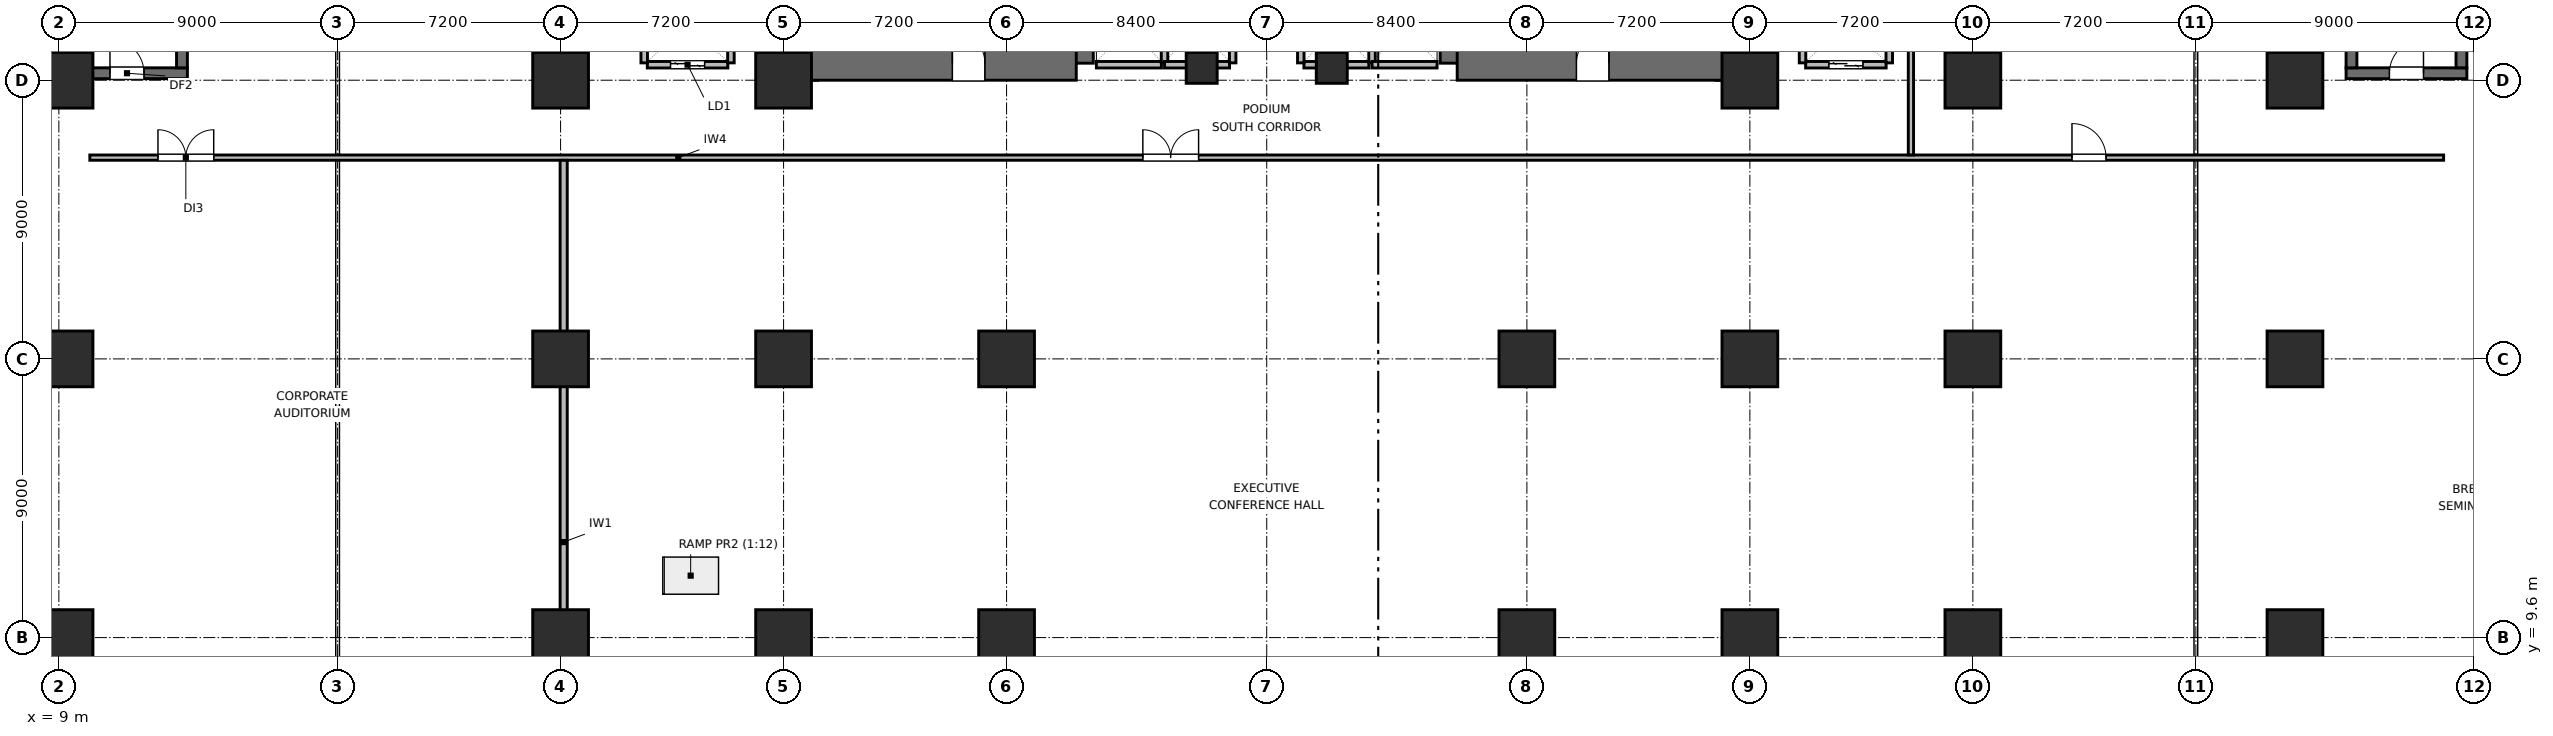
"""IFC4 building model, lengths in metres.
Left out: names, types, materials, properties, quantities, classifications, styles, units other than length and angle.
Written with IfcOpenShell. Run it as: python <this file> out.ifc"""

import sys

from ifc_helpers import new_model, si_unit, direction, frame, frame_2d, origin, origin_2d, place, context, subcontext, project, spatial, rectangle, extrude, element, fill, save


model = new_model("IFC4")
c1 = context("Model", 3, precision=1e-05, world=origin(), true_north=direction((0.0, 1.0)))
c2 = subcontext(c1, "Body", "Model", "MODEL_VIEW")
j1 = project(units=[si_unit("LENGTHUNIT", "METRE"), si_unit("PLANEANGLEUNIT", "RADIAN")], contexts=[c1])
p1 = place(None, origin())
s1 = spatial("IfcSite", under=j1, at=p1, CompositionType="ELEMENT")
p2 = place(p1, origin())
s2 = spatial("IfcBuilding", under=s1, at=p2, CompositionType="ELEMENT")
p3 = place(p2, frame((0.0, 0.0, 4.5)))
s3 = spatial("IfcBuildingStorey", under=s2, at=p3, CompositionType="ELEMENT", Elevation=4.5)
p4 = place(p3, frame((32.95, 27.6, 0.0), z_axis=(0.0, 0.0, 1.0), x_axis=(0.0, 1.0, 0.0)))
e1 = element("IfcWall", 1, at=p4, inside=s3, PredefinedType="SHEAR", context=c2, shape_type="SweptSolid", body=[
    extrude(rectangle(XDim=16.8, YDim=1.1, at=frame_2d((8.4, 0.0))), origin(), (0.0, 0.0, 1.0), 4.2),
])
p5 = place(p3, frame((41.85, 28.15, 0.0), z_axis=(0.0, 0.0, 1.0), x_axis=(0.0, 1.0, 0.0)))
e2 = element("IfcWall", 2, at=p5, inside=s3, PredefinedType="SHEAR", context=c2, shape_type="SweptSolid", body=[
    extrude(rectangle(XDim=6.25, YDim=1.1, at=frame_2d((3.125, 0.0))), origin(), (0.0, 0.0, 1.0), 4.2),
])
p6 = place(p3, frame((32.95, 28.15, 0.0), z_axis=(0.0, 0.0, 1.0), x_axis=(1.0, 0.0, 0.0)))
e3 = element("IfcWall", 3, at=p6, inside=s3, PredefinedType="SHEAR", context=c2, shape_type="SweptSolid", body=[
    extrude(rectangle(XDim=8.9, YDim=1.1, at=frame_2d((4.45, 0.0))), origin(), (0.0, 0.0, 1.0), 4.2),
])
p7 = place(p6, frame((4.9, 0.0, 0.0)))
e4 = element("IfcOpeningElement", 4, at=p7, cuts=e3, PredefinedType="OPENING", context=c2, shape_type="SweptSolid", body=[
    extrude(rectangle(XDim=1.05, YDim=2.04, at=frame_2d((0.525, 1.02))), frame((0.0, 0.56, 0.0), z_axis=(0.0, -1.0, 0.0), x_axis=(1.0, 0.0, 0.0)), (0.0, 0.0, 1.0), 1.12),
])
p8 = place(p3, frame((54.15, 28.15, 0.0), z_axis=(0.0, 0.0, 1.0), x_axis=(0.0, 1.0, 0.0)))
e5 = element("IfcWall", 5, at=p8, inside=s3, PredefinedType="SHEAR", context=c2, shape_type="SweptSolid", body=[
    extrude(rectangle(XDim=7.65, YDim=1.1, at=frame_2d((3.825, 0.0))), origin(), (0.0, 0.0, 1.0), 4.2),
])
p9 = place(p3, frame((63.05, 27.6, 0.0), z_axis=(0.0, 0.0, 1.0), x_axis=(0.0, 1.0, 0.0)))
e6 = element("IfcWall", 6, at=p9, inside=s3, PredefinedType="SHEAR", context=c2, shape_type="SweptSolid", body=[
    extrude(rectangle(XDim=16.8, YDim=1.1, at=frame_2d((8.4, 0.0))), origin(), (0.0, 0.0, 1.0), 4.2),
])
p10 = place(p3, frame((54.15, 28.15, 0.0), z_axis=(0.0, 0.0, 1.0), x_axis=(1.0, 0.0, 0.0)))
e7 = element("IfcWall", 7, at=p10, inside=s3, PredefinedType="SHEAR", context=c2, shape_type="SweptSolid", body=[
    extrude(rectangle(XDim=8.9, YDim=1.1, at=frame_2d((4.45, 0.0))), origin(), (0.0, 0.0, 1.0), 4.2),
])
p11 = place(p10, frame((3.85, 0.0, 0.0)))
e8 = element("IfcOpeningElement", 8, at=p11, cuts=e7, PredefinedType="OPENING", context=c2, shape_type="SweptSolid", body=[
    extrude(rectangle(XDim=1.05, YDim=2.04, at=frame_2d((0.525, 1.02))), frame((0.0, 0.56, 0.0), z_axis=(0.0, -1.0, 0.0), x_axis=(1.0, 0.0, 0.0)), (0.0, 0.0, 1.0), 1.12),
])
p12 = place(p3, frame((9.25, 27.825, 0.0), z_axis=(0.0, 0.0, 1.0), x_axis=(1.0, 0.0, 0.0)))
e9 = element("IfcWall", 9, at=p12, inside=s3, PredefinedType="SHEAR", context=c2, shape_type="SweptSolid", body=[
    extrude(rectangle(XDim=3.9, YDim=0.35, at=frame_2d((1.95, 0.0))), origin(), (0.0, 0.0, 1.0), 4.2),
])
p13 = place(p12, frame((1.4, 0.0, 0.0)))
e10 = element("IfcOpeningElement", 10, at=p13, cuts=e9, PredefinedType="OPENING", context=c2, shape_type="SweptSolid", body=[
    extrude(rectangle(XDim=1.1, YDim=2.05, at=frame_2d((0.55, 1.025))), frame((0.0, 0.185, 0.0), z_axis=(0.0, -1.0, 0.0), x_axis=(1.0, 0.0, 0.0)), (0.0, 0.0, 1.0), 0.37),
])
for number, where, z_axis, x_axis in (
    (11, (9.425, 28.0, 0.0), (0.0, 0.0, 1.0), (0.0, 1.0, 0.0)),
    (12, (12.975, 28.0, 0.0), (0.0, 0.0, 1.0), (0.0, 1.0, 0.0)),
):
    element("IfcWall", number, at=place(p3, frame(where, z_axis=z_axis, x_axis=x_axis)), inside=s3, PredefinedType="SHEAR", context=c2, shape_type="SweptSolid", body=[
        extrude(rectangle(XDim=8.4, YDim=0.35, at=frame_2d((4.2, 0.0))), origin(), (0.0, 0.0, 1.0), 4.2),
    ])
p14 = place(p3, frame((82.85, 27.825, 0.0), z_axis=(0.0, 0.0, 1.0), x_axis=(1.0, 0.0, 0.0)))
e13 = element("IfcWall", 13, at=p14, inside=s3, PredefinedType="SHEAR", context=c2, shape_type="SweptSolid", body=[
    extrude(rectangle(XDim=3.9, YDim=0.35, at=frame_2d((1.95, 0.0))), origin(), (0.0, 0.0, 1.0), 4.2),
])
p15 = place(p14, frame((1.4, 0.0, 0.0)))
e14 = element("IfcOpeningElement", 14, at=p15, cuts=e13, PredefinedType="OPENING", context=c2, shape_type="SweptSolid", body=[
    extrude(rectangle(XDim=1.1, YDim=2.05, at=frame_2d((0.55, 1.025))), frame((0.0, 0.185, 0.0), z_axis=(0.0, -1.0, 0.0), x_axis=(1.0, 0.0, 0.0)), (0.0, 0.0, 1.0), 0.37),
])
for number, where, z_axis, x_axis in (
    (15, (83.025, 28.0, 0.0), (0.0, 0.0, 1.0), (0.0, 1.0, 0.0)),
    (16, (86.575, 28.0, 0.0), (0.0, 0.0, 1.0), (0.0, 1.0, 0.0)),
):
    element("IfcWall", number, at=place(p3, frame(where, z_axis=z_axis, x_axis=x_axis)), inside=s3, PredefinedType="SHEAR", context=c2, shape_type="SweptSolid", body=[
        extrude(rectangle(XDim=8.4, YDim=0.35, at=frame_2d((4.2, 0.0))), origin(), (0.0, 0.0, 1.0), 4.2),
    ])
for number, where, z_axis, x_axis in (
    (17, (9.2, 9.6, 0.0), (0.0, 0.0, 1.0), (1.0, 0.0, 0.0)),
    (18, (9.2, 18.6, 0.0), (0.0, 0.0, 1.0), (1.0, 0.0, 0.0)),
    (19, (9.2, 27.6, 0.0), (0.0, 0.0, 1.0), (1.0, 0.0, 0.0)),
    (20, (25.2, 9.6, 0.0), (0.0, 0.0, 1.0), (1.0, 0.0, 0.0)),
    (21, (25.2, 18.6, 0.0), (0.0, 0.0, 1.0), (1.0, 0.0, 0.0)),
    (22, (25.2, 27.6, 0.0), (0.0, 0.0, 1.0), (1.0, 0.0, 0.0)),
    (23, (32.4, 9.6, 0.0), (0.0, 0.0, 1.0), (1.0, 0.0, 0.0)),
    (24, (32.4, 18.6, 0.0), (0.0, 0.0, 1.0), (1.0, 0.0, 0.0)),
    (25, (32.4, 27.6, 0.0), (0.0, 0.0, 1.0), (1.0, 0.0, 0.0)),
    (26, (39.6, 9.6, 0.0), (0.0, 0.0, 1.0), (1.0, 0.0, 0.0)),
    (27, (39.6, 18.6, 0.0), (0.0, 0.0, 1.0), (1.0, 0.0, 0.0)),
    (28, (56.4, 9.6, 0.0), (0.0, 0.0, 1.0), (1.0, 0.0, 0.0)),
    (29, (56.4, 18.6, 0.0), (0.0, 0.0, 1.0), (1.0, 0.0, 0.0)),
    (30, (63.6, 9.6, 0.0), (0.0, 0.0, 1.0), (1.0, 0.0, 0.0)),
    (31, (63.6, 18.6, 0.0), (0.0, 0.0, 1.0), (1.0, 0.0, 0.0)),
    (32, (63.6, 27.6, 0.0), (0.0, 0.0, 1.0), (1.0, 0.0, 0.0)),
    (33, (70.8, 9.6, 0.0), (0.0, 0.0, 1.0), (1.0, 0.0, 0.0)),
    (34, (70.8, 18.6, 0.0), (0.0, 0.0, 1.0), (1.0, 0.0, 0.0)),
    (35, (70.8, 27.6, 0.0), (0.0, 0.0, 1.0), (1.0, 0.0, 0.0)),
    (36, (81.2, 9.6, 0.0), (0.0, 0.0, 1.0), (1.0, 0.0, 0.0)),
    (37, (81.2, 18.6, 0.0), (0.0, 0.0, 1.0), (1.0, 0.0, 0.0)),
    (38, (81.2, 27.6, 0.0), (0.0, 0.0, 1.0), (1.0, 0.0, 0.0)),
):
    element("IfcColumn", number, at=place(p3, frame(where, z_axis=z_axis, x_axis=x_axis)), inside=s3, PredefinedType="COLUMN", context=c2, shape_type="SweptSolid", body=[
        extrude(rectangle(XDim=1.8, YDim=1.8, at=origin_2d()), origin(), (0.0, 0.0, 1.0), 4.2),
    ])
for number, where, z_axis, x_axis in (
    (39, (45.9, 28.0, 0.0), (0.0, 0.0, 1.0), (1.0, 0.0, 0.0)),
    (40, (50.1, 28.0, 0.0), (0.0, 0.0, 1.0), (1.0, 0.0, 0.0)),
):
    element("IfcColumn", number, at=place(p3, frame(where, z_axis=z_axis, x_axis=x_axis)), inside=s3, PredefinedType="COLUMN", context=c2, shape_type="SweptSolid", body=[
        extrude(rectangle(XDim=1.0, YDim=1.0, at=origin_2d()), origin(), (0.0, 0.0, 1.0), 4.2),
    ])
p16 = place(p3, frame((42.5, 28.1, 0.0), z_axis=(0.0, 0.0, 1.0), x_axis=(1.0, 0.0, 0.0)))
e41 = element("IfcWall", 41, at=p16, inside=s3, PredefinedType="PARTITIONING", context=c2, shape_type="SweptSolid", body=[
    extrude(rectangle(XDim=2.1, YDim=0.21, at=frame_2d((1.05, 0.0))), origin(), (0.0, 0.0, 1.0), 2.765),
])
p17 = place(p3, frame((44.7, 28.16, 0.0), z_axis=(0.0, 0.0, 1.0), x_axis=(0.0, 1.0, 0.0)))
e42 = element("IfcWall", 42, at=p17, inside=s3, PredefinedType="PARTITIONING", context=c2, shape_type="SweptSolid", body=[
    extrude(rectangle(XDim=2.28, YDim=0.21, at=frame_2d((1.14, 0.0))), origin(), (0.0, 0.0, 1.0), 3.88),
])
p18 = place(p3, frame((44.7, 28.1, 0.0), z_axis=(0.0, 0.0, 1.0), x_axis=(1.0, 0.0, 0.0)))
e43 = element("IfcWall", 43, at=p18, inside=s3, PredefinedType="PARTITIONING", context=c2, shape_type="SweptSolid", body=[
    extrude(rectangle(XDim=2.1, YDim=0.21, at=frame_2d((1.05, 0.0))), origin(), (0.0, 0.0, 1.0), 2.765),
])
p19 = place(p3, frame((46.9, 28.16, 0.0), z_axis=(0.0, 0.0, 1.0), x_axis=(0.0, 1.0, 0.0)))
e44 = element("IfcWall", 44, at=p19, inside=s3, PredefinedType="PARTITIONING", context=c2, shape_type="SweptSolid", body=[
    extrude(rectangle(XDim=2.28, YDim=0.21, at=frame_2d((1.14, 0.0))), origin(), (0.0, 0.0, 1.0), 3.88),
])
p20 = place(p3, frame((49.2, 28.1, 0.0), z_axis=(0.0, 0.0, 1.0), x_axis=(1.0, 0.0, 0.0)))
e45 = element("IfcWall", 45, at=p20, inside=s3, PredefinedType="PARTITIONING", context=c2, shape_type="SweptSolid", body=[
    extrude(rectangle(XDim=2.1, YDim=0.21, at=frame_2d((1.05, 0.0))), origin(), (0.0, 0.0, 1.0), 2.765),
])
for number, where, z_axis, x_axis in (
    (46, (49.1, 28.16, 0.0), (0.0, 0.0, 1.0), (0.0, 1.0, 0.0)),
    (47, (51.4, 28.16, 0.0), (0.0, 0.0, 1.0), (0.0, 1.0, 0.0)),
):
    element("IfcWall", number, at=place(p3, frame(where, z_axis=z_axis, x_axis=x_axis)), inside=s3, PredefinedType="PARTITIONING", context=c2, shape_type="SweptSolid", body=[
        extrude(rectangle(XDim=2.28, YDim=0.21, at=frame_2d((1.14, 0.0))), origin(), (0.0, 0.0, 1.0), 3.88),
    ])
p21 = place(p3, frame((51.4, 28.1, 0.0), z_axis=(0.0, 0.0, 1.0), x_axis=(1.0, 0.0, 0.0)))
e48 = element("IfcWall", 48, at=p21, inside=s3, PredefinedType="PARTITIONING", context=c2, shape_type="SweptSolid", body=[
    extrude(rectangle(XDim=2.1, YDim=0.21, at=frame_2d((1.05, 0.0))), origin(), (0.0, 0.0, 1.0), 2.765),
])
p22 = place(p3, frame((28.0, 28.1, 0.0), z_axis=(0.0, 0.0, 1.0), x_axis=(1.0, 0.0, 0.0)))
e49 = element("IfcWall", 49, at=p22, inside=s3, PredefinedType="PARTITIONING", context=c2, shape_type="SweptSolid", body=[
    extrude(rectangle(XDim=2.6, YDim=0.21, at=frame_2d((1.3, 0.0))), origin(), (0.0, 0.0, 1.0), 3.88),
])
p23 = place(p22, frame((0.75, 0.0, 0.0)))
e50 = element("IfcOpeningElement", 50, at=p23, cuts=e49, PredefinedType="OPENING", context=c2, shape_type="SweptSolid", body=[
    extrude(rectangle(XDim=1.1, YDim=2.04, at=frame_2d((0.55, 1.02))), frame((0.0, 0.115, 0.0), z_axis=(0.0, -1.0, 0.0), x_axis=(1.0, 0.0, 0.0)), (0.0, 0.0, 1.0), 0.23),
])
for number, where, z_axis, x_axis in (
    (51, (27.9, 28.16, 0.0), (0.0, 0.0, 1.0), (0.0, 1.0, 0.0)),
    (52, (30.7, 28.16, 0.0), (0.0, 0.0, 1.0), (0.0, 1.0, 0.0)),
):
    element("IfcWall", number, at=place(p3, frame(where, z_axis=z_axis, x_axis=x_axis)), inside=s3, PredefinedType="PARTITIONING", context=c2, shape_type="SweptSolid", body=[
        extrude(rectangle(XDim=2.48, YDim=0.21, at=frame_2d((1.24, 0.0))), origin(), (0.0, 0.0, 1.0), 3.88),
    ])
p24 = place(p3, frame((65.4, 28.1, 0.0), z_axis=(0.0, 0.0, 1.0), x_axis=(1.0, 0.0, 0.0)))
e53 = element("IfcWall", 53, at=p24, inside=s3, PredefinedType="PARTITIONING", context=c2, shape_type="SweptSolid", body=[
    extrude(rectangle(XDim=2.6, YDim=0.21, at=frame_2d((1.3, 0.0))), origin(), (0.0, 0.0, 1.0), 3.88),
])
p25 = place(p24, frame((0.75, 0.0, 0.0)))
e54 = element("IfcOpeningElement", 54, at=p25, cuts=e53, PredefinedType="OPENING", context=c2, shape_type="SweptSolid", body=[
    extrude(rectangle(XDim=1.1, YDim=2.04, at=frame_2d((0.55, 1.02))), frame((0.0, 0.115, 0.0), z_axis=(0.0, -1.0, 0.0), x_axis=(1.0, 0.0, 0.0)), (0.0, 0.0, 1.0), 0.23),
])
for number, where, z_axis, x_axis in (
    (55, (65.3, 28.16, 0.0), (0.0, 0.0, 1.0), (0.0, 1.0, 0.0)),
    (56, (68.1, 28.16, 0.0), (0.0, 0.0, 1.0), (0.0, 1.0, 0.0)),
):
    element("IfcWall", number, at=place(p3, frame(where, z_axis=z_axis, x_axis=x_axis)), inside=s3, PredefinedType="PARTITIONING", context=c2, shape_type="SweptSolid", body=[
        extrude(rectangle(XDim=2.48, YDim=0.21, at=frame_2d((1.24, 0.0))), origin(), (0.0, 0.0, 1.0), 3.88),
    ])
p26 = place(p3, frame((10.0, 25.1, 0.0), z_axis=(0.0, 0.0, 1.0), x_axis=(1.0, 0.0, 0.0)))
e57 = element("IfcWall", 57, at=p26, inside=s3, PredefinedType="PARTITIONING", context=c2, shape_type="SweptSolid", body=[
    extrude(rectangle(XDim=76.0, YDim=0.17, at=frame_2d((38.0, 0.0))), origin(), (0.0, 0.0, 1.0), 3.88),
])
p27 = place(p26, frame((2.2, 0.0, 0.0)))
e58 = element("IfcOpeningElement", 58, at=p27, cuts=e57, PredefinedType="OPENING", context=c2, shape_type="SweptSolid", body=[
    extrude(rectangle(XDim=1.8, YDim=2.06, at=frame_2d((0.9, 1.03))), frame((0.0, 0.095, 0.0), z_axis=(0.0, -1.0, 0.0), x_axis=(1.0, 0.0, 0.0)), (0.0, 0.0, 1.0), 0.19),
])
p28 = place(p26, frame((34.0, 0.0, 0.0)))
e59 = element("IfcOpeningElement", 59, at=p28, cuts=e57, PredefinedType="OPENING", context=c2, shape_type="SweptSolid", body=[
    extrude(rectangle(XDim=1.8, YDim=2.06, at=frame_2d((0.9, 1.03))), frame((0.0, 0.095, 0.0), z_axis=(0.0, -1.0, 0.0), x_axis=(1.0, 0.0, 0.0)), (0.0, 0.0, 1.0), 0.19),
])
p29 = place(p26, frame((64.0, 0.0, 0.0)))
e60 = element("IfcOpeningElement", 60, at=p29, cuts=e57, PredefinedType="OPENING", context=c2, shape_type="SweptSolid", body=[
    extrude(rectangle(XDim=1.1, YDim=2.05, at=frame_2d((0.55, 1.025))), frame((0.0, 0.095, 0.0), z_axis=(0.0, -1.0, 0.0), x_axis=(1.0, 0.0, 0.0)), (0.0, 0.0, 1.0), 0.19),
])
p30 = place(p3, frame((68.8, 25.187, 0.0), z_axis=(0.0, 0.0, 1.0), x_axis=(0.0, 1.0, 0.0)))
e61 = element("IfcWall", 61, at=p30, inside=s3, PredefinedType="PARTITIONING", context=c2, shape_type="SweptSolid", body=[
    extrude(rectangle(XDim=46.448, YDim=0.17, at=frame_2d((23.224, 0.0))), origin(), (0.0, 0.0, 1.0), 3.88),
])
p31 = place(p30, frame((15.913, 0.0, 0.0)))
e62 = element("IfcOpeningElement", 62, at=p31, cuts=e61, PredefinedType="OPENING", context=c2, shape_type="SweptSolid", body=[
    extrude(rectangle(XDim=1.1, YDim=2.05, at=frame_2d((0.55, 1.025))), frame((0.0, 0.095, 0.0), z_axis=(0.0, -1.0, 0.0), x_axis=(1.0, 0.0, 0.0)), (0.0, 0.0, 1.0), 0.19),
])
p32 = place(p3, frame((25.3, 0.355, 0.0), z_axis=(0.0, 0.0, 1.0), x_axis=(0.0, 1.0, 0.0)))
e63 = element("IfcWall", 63, at=p32, inside=s3, PredefinedType="PARTITIONING", context=c2, shape_type="SweptSolid", body=[
    extrude(rectangle(XDim=24.658, YDim=0.23, at=frame_2d((12.329, 0.0))), origin(), (0.0, 0.0, 1.0), 3.092),
])
p33 = place(p13, origin())
e64 = element("IfcDoor", 64, at=p33, inside=s3, OperationType="SINGLE_SWING_LEFT", PredefinedType="DOOR", context=c2, shape_type="SweptSolid", body=[
    extrude(rectangle(XDim=1.1, YDim=2.05, at=frame_2d((0.55, 1.025))), frame((0.0, 0.025, 0.0), z_axis=(0.0, -1.0, 0.0), x_axis=(1.0, 0.0, 0.0)), (0.0, 0.0, 1.0), 0.05),
])
fill(e10, e64)
p34 = place(p15, origin())
e65 = element("IfcDoor", 65, at=p34, inside=s3, OperationType="SINGLE_SWING_RIGHT", PredefinedType="DOOR", context=c2, shape_type="SweptSolid", body=[
    extrude(rectangle(XDim=1.1, YDim=2.05, at=frame_2d((0.55, 1.025))), frame((0.0, 0.025, 0.0), z_axis=(0.0, -1.0, 0.0), x_axis=(1.0, 0.0, 0.0)), (0.0, 0.0, 1.0), 0.05),
])
fill(e14, e65)
p35 = place(p23, origin())
e66 = element("IfcDoor", 66, at=p35, inside=s3, OperationType="DOUBLE_DOOR_SLIDING", PredefinedType="DOOR", context=c2, shape_type="SweptSolid", body=[
    extrude(rectangle(XDim=1.1, YDim=2.04, at=frame_2d((0.55, 1.02))), frame((0.0, 0.025, 0.0), z_axis=(0.0, -1.0, 0.0), x_axis=(1.0, 0.0, 0.0)), (0.0, 0.0, 1.0), 0.05),
])
fill(e50, e66)
p36 = place(p25, origin())
e67 = element("IfcDoor", 67, at=p36, inside=s3, OperationType="DOUBLE_DOOR_SLIDING", PredefinedType="DOOR", context=c2, shape_type="SweptSolid", body=[
    extrude(rectangle(XDim=1.1, YDim=2.04, at=frame_2d((0.55, 1.02))), frame((0.0, 0.025, 0.0), z_axis=(0.0, -1.0, 0.0), x_axis=(1.0, 0.0, 0.0)), (0.0, 0.0, 1.0), 0.05),
])
fill(e54, e67)
p37 = place(p7, origin())
e68 = element("IfcDoor", 68, at=p37, inside=s3, OperationType="SINGLE_SWING_LEFT", PredefinedType="DOOR", context=c2, shape_type="SweptSolid", body=[
    extrude(rectangle(XDim=1.05, YDim=2.04, at=frame_2d((0.525, 1.02))), frame((0.0, 0.025, 0.0), z_axis=(0.0, -1.0, 0.0), x_axis=(1.0, 0.0, 0.0)), (0.0, 0.0, 1.0), 0.05),
])
fill(e4, e68)
p38 = place(p11, origin())
e69 = element("IfcDoor", 69, at=p38, inside=s3, OperationType="SINGLE_SWING_RIGHT", PredefinedType="DOOR", context=c2, shape_type="SweptSolid", body=[
    extrude(rectangle(XDim=1.05, YDim=2.04, at=frame_2d((0.525, 1.02))), frame((0.0, 0.025, 0.0), z_axis=(0.0, -1.0, 0.0), x_axis=(1.0, 0.0, 0.0)), (0.0, 0.0, 1.0), 0.05),
])
fill(e8, e69)
p39 = place(p27, origin())
e70 = element("IfcDoor", 70, at=p39, inside=s3, OperationType="DOUBLE_DOOR_SINGLE_SWING", PredefinedType="DOOR", context=c2, shape_type="SweptSolid", body=[
    extrude(rectangle(XDim=1.8, YDim=2.06, at=frame_2d((0.9, 1.03))), frame((0.0, 0.025, 0.0), z_axis=(0.0, -1.0, 0.0), x_axis=(1.0, 0.0, 0.0)), (0.0, 0.0, 1.0), 0.05),
])
fill(e58, e70)
p40 = place(p28, origin())
e71 = element("IfcDoor", 71, at=p40, inside=s3, OperationType="DOUBLE_DOOR_SINGLE_SWING", PredefinedType="DOOR", context=c2, shape_type="SweptSolid", body=[
    extrude(rectangle(XDim=1.8, YDim=2.06, at=frame_2d((0.9, 1.03))), frame((0.0, 0.025, 0.0), z_axis=(0.0, -1.0, 0.0), x_axis=(1.0, 0.0, 0.0)), (0.0, 0.0, 1.0), 0.05),
])
fill(e59, e71)
p41 = place(p29, origin())
e72 = element("IfcDoor", 72, at=p41, inside=s3, OperationType="SINGLE_SWING_LEFT", PredefinedType="DOOR", context=c2, shape_type="SweptSolid", body=[
    extrude(rectangle(XDim=1.1, YDim=2.05, at=frame_2d((0.55, 1.025))), frame((0.0, 0.025, 0.0), z_axis=(0.0, -1.0, 0.0), x_axis=(1.0, 0.0, 0.0)), (0.0, 0.0, 1.0), 0.05),
])
fill(e60, e72)
save(model, sys.argv[1])
